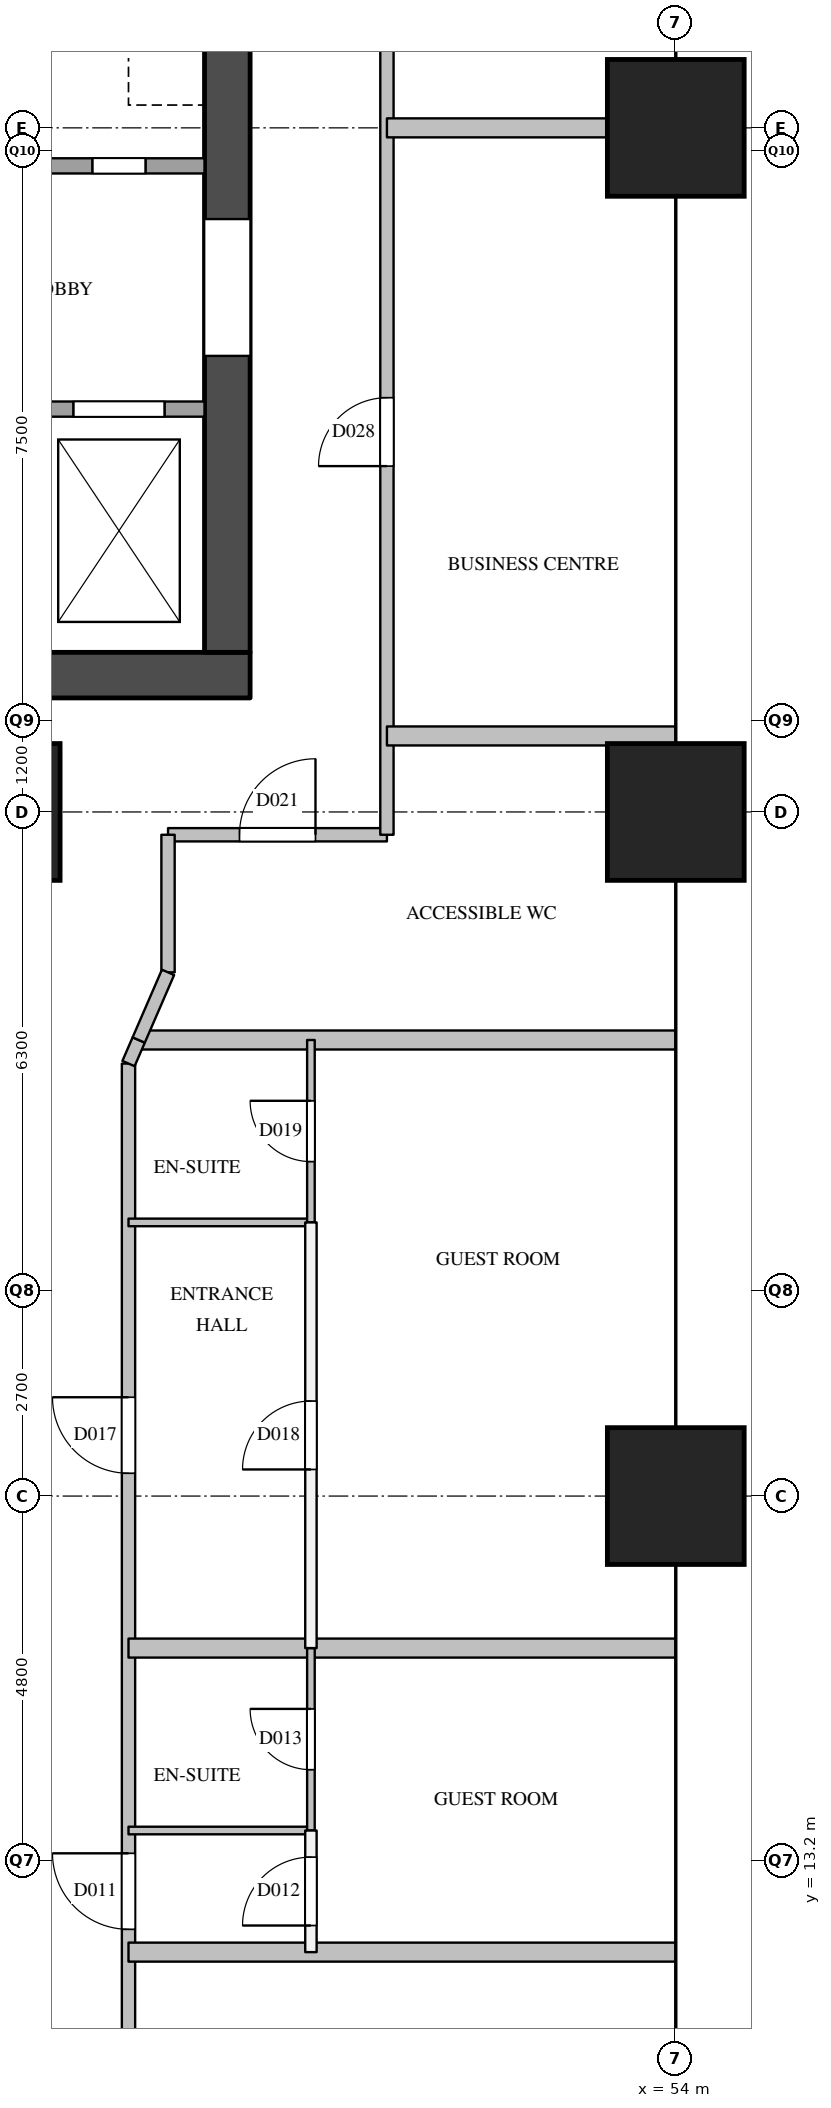
"""IFC4 building model, lengths in metres.
Left out: names, types, materials, properties, quantities, classifications, styles, units other than length and angle.
Written with IfcOpenShell. Run it as: python <this file> out.ifc"""

import sys

from ifc_helpers import new_model, si_unit, direction, frame, frame_2d, origin, origin_2d, place, context, subcontext, project, spatial, rectangle, extrude, element, fill, save


model = new_model("IFC4")
c1 = context("Model", 3, precision=1e-05, world=origin(), true_north=direction((0.0, 1.0)))
c2 = subcontext(c1, "Body", "Model", "MODEL_VIEW")
j1 = project(units=[si_unit("LENGTHUNIT", "METRE"), si_unit("PLANEANGLEUNIT", "RADIAN")], contexts=[c1])
p1 = place(None, origin())
s1 = spatial("IfcSite", under=j1, at=p1, CompositionType="ELEMENT")
p2 = place(p1, origin())
s2 = spatial("IfcBuilding", under=s1, at=p2, CompositionType="ELEMENT")
p3 = place(p2, frame((0.0, 0.0, 108.2)))
s3 = spatial("IfcBuildingStorey", under=s2, at=p3, CompositionType="ELEMENT", Elevation=108.2)
for number, where, z_axis, x_axis in (
    (1, (45.0, 27.0, 0.0), (0.0, 0.0, 1.0), (1.0, 0.0, 0.0)),
    (2, (54.0, 18.0, 0.0), (0.0, 0.0, 1.0), (1.0, 0.0, 0.0)),
    (3, (54.0, 27.0, 0.0), (0.0, 0.0, 1.0), (1.0, 0.0, 0.0)),
    (4, (54.0, 36.0, 0.0), (0.0, 0.0, 1.0), (1.0, 0.0, 0.0)),
):
    element("IfcColumn", number, at=place(p3, frame(where, z_axis=z_axis, x_axis=x_axis)), inside=s3, PredefinedType="COLUMN", context=c2, shape_type="SweptSolid", body=[
        extrude(rectangle(XDim=1.8, YDim=1.8, at=origin_2d()), origin(), (0.0, 0.0, 1.0), 3.8),
    ])
p4 = place(p3, frame((36.0, 28.8, 0.0), z_axis=(0.0, 0.0, 1.0), x_axis=(1.0, 0.0, 0.0)))
e5 = element("IfcWall", 5, at=p4, inside=s3, PredefinedType="SHEAR", context=c2, shape_type="SweptSolid", body=[
    extrude(rectangle(XDim=12.4, YDim=0.6, at=frame_2d((6.2, 0.0))), origin(), (0.0, 0.0, 1.0), 3.5),
])
p5 = place(p3, frame((48.1, 29.1, 0.0), z_axis=(0.0, 0.0, 1.0), x_axis=(0.0, 1.0, 0.0)))
e6 = element("IfcWall", 6, at=p5, inside=s3, PredefinedType="SHEAR", context=c2, shape_type="SweptSolid", body=[
    extrude(rectangle(XDim=20.3, YDim=0.6, at=frame_2d((10.15, 0.0))), origin(), (0.0, 0.0, 1.0), 3.5),
])
p6 = place(p5, frame((12.5, 0.0, 0.0)))
e7 = element("IfcOpeningElement", 7, at=p6, cuts=e6, PredefinedType="OPENING", context=c2, shape_type="SweptSolid", body=[
    extrude(rectangle(XDim=0.7, YDim=2.1, at=frame_2d((0.35, 1.05))), frame((0.0, 0.31, 0.0), z_axis=(0.0, -1.0, 0.0), x_axis=(1.0, 0.0, 0.0)), (0.0, 0.0, 1.0), 0.62),
])
p7 = place(p5, frame((3.9, 0.0, 0.0)))
e8 = element("IfcOpeningElement", 8, at=p7, cuts=e6, PredefinedType="OPENING", context=c2, shape_type="SweptSolid", body=[
    extrude(rectangle(XDim=1.8, YDim=2.1, at=frame_2d((0.9, 1.05))), frame((0.0, 0.31, 0.0), z_axis=(0.0, -1.0, 0.0), x_axis=(1.0, 0.0, 0.0)), (0.0, 0.0, 1.0), 0.62),
])
p8 = place(p3, frame((36.6, 32.3, 0.0), z_axis=(0.0, 0.0, 1.0), x_axis=(1.0, 0.0, 0.0)))
e9 = element("IfcWall", 9, at=p8, inside=s3, PredefinedType="SOLIDWALL", context=c2, shape_type="SweptSolid", body=[
    extrude(rectangle(XDim=11.2, YDim=0.2, at=frame_2d((5.6, 0.0))), origin(), (0.0, 0.0, 1.0), 3.5),
])
p9 = place(p8, frame((7.225, 0.0, 0.0)))
e10 = element("IfcOpeningElement", 10, at=p9, cuts=e9, PredefinedType="OPENING", context=c2, shape_type="SweptSolid", body=[
    extrude(rectangle(XDim=1.2, YDim=2.1, at=frame_2d((0.6, 1.05))), frame((0.0, 0.11, 0.0), z_axis=(0.0, -1.0, 0.0), x_axis=(1.0, 0.0, 0.0)), (0.0, 0.0, 1.0), 0.22),
])
p10 = place(p8, frame((9.475, 0.0, 0.0)))
e11 = element("IfcOpeningElement", 11, at=p10, cuts=e9, PredefinedType="OPENING", context=c2, shape_type="SweptSolid", body=[
    extrude(rectangle(XDim=1.2, YDim=2.1, at=frame_2d((0.6, 1.05))), frame((0.0, 0.11, 0.0), z_axis=(0.0, -1.0, 0.0), x_axis=(1.0, 0.0, 0.0)), (0.0, 0.0, 1.0), 0.22),
])
p11 = place(p3, frame((43.3, 35.5, 0.0), z_axis=(0.0, 0.0, 1.0), x_axis=(1.0, 0.0, 0.0)))
e12 = element("IfcWall", 12, at=p11, inside=s3, PredefinedType="SOLIDWALL", context=c2, shape_type="SweptSolid", body=[
    extrude(rectangle(XDim=4.5, YDim=0.2, at=frame_2d((2.25, 0.0))), origin(), (0.0, 0.0, 1.0), 3.5),
])
p12 = place(p11, frame((0.525, 0.0, 0.0)))
e13 = element("IfcOpeningElement", 13, at=p12, cuts=e12, PredefinedType="OPENING", context=c2, shape_type="SweptSolid", body=[
    extrude(rectangle(XDim=1.2, YDim=2.1, at=frame_2d((0.6, 1.05))), frame((0.0, 0.11, 0.0), z_axis=(0.0, -1.0, 0.0), x_axis=(1.0, 0.0, 0.0)), (0.0, 0.0, 1.0), 0.22),
])
p13 = place(p11, frame((3.025, 0.0, 0.0)))
e14 = element("IfcOpeningElement", 14, at=p13, cuts=e12, PredefinedType="OPENING", context=c2, shape_type="SweptSolid", body=[
    extrude(rectangle(XDim=0.7, YDim=2.1, at=frame_2d((0.35, 1.05))), frame((0.0, 0.11, 0.0), z_axis=(0.0, -1.0, 0.0), x_axis=(1.0, 0.0, 0.0)), (0.0, 0.0, 1.0), 0.22),
])
p14 = place(p3, frame((47.32, 26.7, 0.0), z_axis=(0.0, 0.0, 1.0), x_axis=(1.0, 0.0, 0.0)))
e15 = element("IfcWall", 15, at=p14, inside=s3, PredefinedType="PARTITIONING", context=c2, shape_type="SweptSolid", body=[
    extrude(rectangle(XDim=2.88, YDim=0.175, at=frame_2d((1.44, 0.0))), origin(), (0.0, 0.0, 1.0), 2.5),
])
p15 = place(p14, frame((0.94, 0.0, 0.0)))
e16 = element("IfcOpeningElement", 16, at=p15, cuts=e15, PredefinedType="OPENING", context=c2, shape_type="SweptSolid", body=[
    extrude(rectangle(XDim=1.0, YDim=2.1, at=frame_2d((0.5, 1.05))), frame((0.0, 0.097, 0.0), z_axis=(0.0, -1.0, 0.0), x_axis=(1.0, 0.0, 0.0)), (0.0, 0.0, 1.0), 0.195),
])
p16 = place(p3, frame((46.8, 7.2, 0.0), z_axis=(0.0, 0.0, 1.0), x_axis=(0.0, 1.0, 0.0)))
e17 = element("IfcWall", 17, at=p16, inside=s3, PredefinedType="PARTITIONING", context=c2, shape_type="SweptSolid", body=[
    extrude(rectangle(XDim=16.49, YDim=0.175, at=frame_2d((8.245, 0.0))), origin(), (0.0, 0.0, 1.0), 3.5),
])
p17 = place(p16, frame((1.95, 0.0, 0.0)))
e18 = element("IfcOpeningElement", 18, at=p17, cuts=e17, PredefinedType="OPENING", context=c2, shape_type="SweptSolid", body=[
    extrude(rectangle(XDim=0.9, YDim=2.1, at=frame_2d((0.45, 1.05))), frame((0.0, 0.097, 0.0), z_axis=(0.0, -1.0, 0.0), x_axis=(1.0, 0.0, 0.0)), (0.0, 0.0, 1.0), 0.195),
])
p18 = place(p16, frame((5.1, 0.0, 0.0)))
e19 = element("IfcOpeningElement", 19, at=p18, cuts=e17, PredefinedType="OPENING", context=c2, shape_type="SweptSolid", body=[
    extrude(rectangle(XDim=1.0, YDim=2.1, at=frame_2d((0.5, 1.05))), frame((0.0, 0.097, 0.0), z_axis=(0.0, -1.0, 0.0), x_axis=(1.0, 0.0, 0.0)), (0.0, 0.0, 1.0), 0.195),
])
p19 = place(p16, frame((11.1, 0.0, 0.0)))
e20 = element("IfcOpeningElement", 20, at=p19, cuts=e17, PredefinedType="OPENING", context=c2, shape_type="SweptSolid", body=[
    extrude(rectangle(XDim=1.0, YDim=2.1, at=frame_2d((0.5, 1.05))), frame((0.0, 0.097, 0.0), z_axis=(0.0, -1.0, 0.0), x_axis=(1.0, 0.0, 0.0)), (0.0, 0.0, 1.0), 0.195),
])
p20 = place(p3, frame((47.32, 24.89, 0.0), z_axis=(0.0, 0.0, 1.0), x_axis=(0.0, 1.0, 0.0)))
e21 = element("IfcWall", 21, at=p20, inside=s3, PredefinedType="PARTITIONING", context=c2, shape_type="SweptSolid", body=[
    extrude(rectangle(XDim=1.81, YDim=0.175, at=frame_2d((0.905, 0.0))), origin(), (0.0, 0.0, 1.0), 2.5),
])
p21 = place(p3, frame((50.2, 26.7, 0.0), z_axis=(0.0, 0.0, 1.0), x_axis=(0.0, 1.0, 0.0)))
e22 = element("IfcWall", 22, at=p21, inside=s3, PredefinedType="PARTITIONING", context=c2, shape_type="SweptSolid", body=[
    extrude(rectangle(XDim=25.1, YDim=0.175, at=frame_2d((12.55, 0.0))), origin(), (0.0, 0.0, 1.0), 2.5),
])
p22 = place(p21, frame((4.85, 0.0, 0.0)))
e23 = element("IfcOpeningElement", 23, at=p22, cuts=e22, PredefinedType="OPENING", context=c2, shape_type="SweptSolid", body=[
    extrude(rectangle(XDim=0.9, YDim=2.1, at=frame_2d((0.45, 1.05))), frame((0.0, 0.097, 0.0), z_axis=(0.0, -1.0, 0.0), x_axis=(1.0, 0.0, 0.0)), (0.0, 0.0, 1.0), 0.195),
])
p23 = place(p21, frame((12.85, 0.0, 0.0)))
e24 = element("IfcOpeningElement", 24, at=p23, cuts=e22, PredefinedType="OPENING", context=c2, shape_type="SweptSolid", body=[
    extrude(rectangle(XDim=0.9, YDim=2.1, at=frame_2d((0.45, 1.05))), frame((0.0, 0.097, 0.0), z_axis=(0.0, -1.0, 0.0), x_axis=(1.0, 0.0, 0.0)), (0.0, 0.0, 1.0), 0.195),
])
p24 = place(p21, frame((20.75, 0.0, 0.0)))
e25 = element("IfcOpeningElement", 25, at=p24, cuts=e22, PredefinedType="OPENING", context=c2, shape_type="SweptSolid", body=[
    extrude(rectangle(XDim=0.9, YDim=2.1, at=frame_2d((0.45, 1.05))), frame((0.0, 0.097, 0.0), z_axis=(0.0, -1.0, 0.0), x_axis=(1.0, 0.0, 0.0)), (0.0, 0.0, 1.0), 0.195),
])
p25 = place(p3, frame((49.2, 12.0, 0.0), z_axis=(0.0, 0.0, 1.0), x_axis=(0.0, 1.0, 0.0)))
e26 = element("IfcWall", 26, at=p25, inside=s3, PredefinedType="PARTITIONING", context=c2, shape_type="SweptSolid", body=[
    extrude(rectangle(XDim=1.6, YDim=0.15, at=frame_2d((0.8, 0.0))), origin(), (0.0, 0.0, 1.0), 3.5),
])
p26 = place(p25, frame((0.35, 0.0, 0.0)))
e27 = element("IfcOpeningElement", 27, at=p26, cuts=e26, PredefinedType="OPENING", context=c2, shape_type="SweptSolid", body=[
    extrude(rectangle(XDim=0.9, YDim=2.1, at=frame_2d((0.45, 1.05))), frame((0.0, 0.085, 0.0), z_axis=(0.0, -1.0, 0.0), x_axis=(1.0, 0.0, 0.0)), (0.0, 0.0, 1.0), 0.17),
])
p27 = place(p3, frame((49.2, 16.0, 0.0), z_axis=(0.0, 0.0, 1.0), x_axis=(0.0, 1.0, 0.0)))
e28 = element("IfcWall", 28, at=p27, inside=s3, PredefinedType="PARTITIONING", context=c2, shape_type="SweptSolid", body=[
    extrude(rectangle(XDim=5.6, YDim=0.15, at=frame_2d((2.8, 0.0))), origin(), (0.0, 0.0, 1.0), 3.5),
])
p28 = place(p27, frame((2.35, 0.0, 0.0)))
e29 = element("IfcOpeningElement", 29, at=p28, cuts=e28, PredefinedType="OPENING", context=c2, shape_type="SweptSolid", body=[
    extrude(rectangle(XDim=0.9, YDim=2.1, at=frame_2d((0.45, 1.05))), frame((0.0, 0.085, 0.0), z_axis=(0.0, -1.0, 0.0), x_axis=(1.0, 0.0, 0.0)), (0.0, 0.0, 1.0), 0.17),
])
for number, where, z_axis, x_axis in (
    (30, (46.8, 12.0, 0.0), (0.0, 0.0, 1.0), (1.0, 0.0, 0.0)),
    (31, (46.8, 16.0, 0.0), (0.0, 0.0, 1.0), (1.0, 0.0, 0.0)),
):
    element("IfcWall", number, at=place(p3, frame(where, z_axis=z_axis, x_axis=x_axis)), inside=s3, PredefinedType="PARTITIONING", context=c2, shape_type="SweptSolid", body=[
        extrude(rectangle(XDim=7.2, YDim=0.25, at=frame_2d((3.6, 0.0))), origin(), (0.0, 0.0, 1.0), 2.5),
    ])
p29 = place(p3, frame((46.934, 24.0, 0.0), z_axis=(0.0, 0.0, 1.0), x_axis=(1.0, 0.0, 0.0)))
e32 = element("IfcWall", 32, at=p29, inside=s3, PredefinedType="PARTITIONING", context=c2, shape_type="SweptSolid", body=[
    extrude(rectangle(XDim=7.066, YDim=0.25, at=frame_2d((3.533, 0.0))), origin(), (0.0, 0.0, 1.0), 2.5),
])
p30 = place(p3, frame((50.2, 28.0, 0.0), z_axis=(0.0, 0.0, 1.0), x_axis=(1.0, 0.0, 0.0)))
e33 = element("IfcWall", 33, at=p30, inside=s3, PredefinedType="PARTITIONING", context=c2, shape_type="SweptSolid", body=[
    extrude(rectangle(XDim=3.8, YDim=0.25, at=frame_2d((1.9, 0.0))), origin(), (0.0, 0.0, 1.0), 2.5),
])
p31 = place(p3, frame((50.2, 36.0, 0.0), z_axis=(0.0, 0.0, 1.0), x_axis=(1.0, 0.0, 0.0)))
e34 = element("IfcWall", 34, at=p31, inside=s3, PredefinedType="PARTITIONING", context=c2, shape_type="SweptSolid", body=[
    extrude(rectangle(XDim=3.8, YDim=0.25, at=frame_2d((1.9, 0.0))), origin(), (0.0, 0.0, 1.0), 3.5),
])
for number, where, z_axis, x_axis in (
    (35, (46.8, 13.6, 0.0), (0.0, 0.0, 1.0), (1.0, 0.0, 0.0)),
    (36, (46.8, 21.6, 0.0), (0.0, 0.0, 1.0), (1.0, 0.0, 0.0)),
):
    element("IfcWall", number, at=place(p3, frame(where, z_axis=z_axis, x_axis=x_axis)), inside=s3, PredefinedType="PARTITIONING", context=c2, shape_type="SweptSolid", body=[
        extrude(rectangle(XDim=2.4, YDim=0.1, at=frame_2d((1.2, 0.0))), origin(), (0.0, 0.0, 1.0), 3.5),
    ])
p32 = place(p3, frame((49.2, 13.6, 0.0), z_axis=(0.0, 0.0, 1.0), x_axis=(0.0, 1.0, 0.0)))
e37 = element("IfcWall", 37, at=p32, inside=s3, PredefinedType="PARTITIONING", context=c2, shape_type="SweptSolid", body=[
    extrude(rectangle(XDim=2.4, YDim=0.1, at=frame_2d((1.2, 0.0))), origin(), (0.0, 0.0, 1.0), 3.5),
])
p33 = place(p32, frame((0.8, 0.0, 0.0)))
e38 = element("IfcOpeningElement", 38, at=p33, cuts=e37, PredefinedType="OPENING", context=c2, shape_type="SweptSolid", body=[
    extrude(rectangle(XDim=0.8, YDim=2.1, at=frame_2d((0.4, 1.05))), frame((0.0, 0.06, 0.0), z_axis=(0.0, -1.0, 0.0), x_axis=(1.0, 0.0, 0.0)), (0.0, 0.0, 1.0), 0.12),
])
p34 = place(p3, frame((49.2, 21.6, 0.0), z_axis=(0.0, 0.0, 1.0), x_axis=(0.0, 1.0, 0.0)))
e39 = element("IfcWall", 39, at=p34, inside=s3, PredefinedType="PARTITIONING", context=c2, shape_type="SweptSolid", body=[
    extrude(rectangle(XDim=2.4, YDim=0.1, at=frame_2d((1.2, 0.0))), origin(), (0.0, 0.0, 1.0), 3.5),
])
p35 = place(p34, frame((0.8, 0.0, 0.0)))
e40 = element("IfcOpeningElement", 40, at=p35, cuts=e39, PredefinedType="OPENING", context=c2, shape_type="SweptSolid", body=[
    extrude(rectangle(XDim=0.8, YDim=2.1, at=frame_2d((0.4, 1.05))), frame((0.0, 0.06, 0.0), z_axis=(0.0, -1.0, 0.0), x_axis=(1.0, 0.0, 0.0)), (0.0, 0.0, 1.0), 0.12),
])
p36 = place(p3, frame((46.934, 24.0, 0.0), z_axis=(0.0, 0.0, 1.0), x_axis=(-0.397404653206, -0.917643471949, 0.0)))
e41 = element("IfcWall", 41, at=p36, inside=s3, PredefinedType="PARTITIONING", context=c2, shape_type="SweptSolid", body=[
    extrude(rectangle(XDim=0.338, YDim=0.175, at=frame_2d((0.169, 0.0))), origin(), (0.0, 0.0, 1.0), 3.5),
])
p37 = place(p3, frame((47.32, 24.89, 0.0), z_axis=(0.0, 0.0, 1.0), x_axis=(-0.397713396445, -0.917509702558, 0.0)))
e42 = element("IfcWall", 42, at=p37, inside=s3, PredefinedType="PARTITIONING", context=c2, shape_type="SweptSolid", body=[
    extrude(rectangle(XDim=0.97, YDim=0.175, at=frame_2d((0.485, 0.0))), origin(), (0.0, 0.0, 1.0), 3.5),
])
p38 = place(p10, origin())
e43 = element("IfcDoor", 43, at=p38, inside=s3, OperationType="SLIDING_TO_LEFT", PredefinedType="DOOR", context=c2, shape_type="SweptSolid", body=[
    extrude(rectangle(XDim=1.2, YDim=2.1, at=frame_2d((0.6, 1.05))), frame((0.0, 0.025, 0.0), z_axis=(0.0, -1.0, 0.0), x_axis=(1.0, 0.0, 0.0)), (0.0, 0.0, 1.0), 0.05),
])
fill(e11, e43)
p39 = place(p7, origin())
e44 = element("IfcDoor", 44, at=p39, inside=s3, OperationType="DOUBLE_DOOR_SINGLE_SWING", PredefinedType="DOOR", context=c2, shape_type="SweptSolid", body=[
    extrude(rectangle(XDim=1.8, YDim=2.1, at=frame_2d((0.9, 1.05))), frame((0.0, 0.025, 0.0), z_axis=(0.0, -1.0, 0.0), x_axis=(1.0, 0.0, 0.0)), (0.0, 0.0, 1.0), 0.05),
])
fill(e8, e44)
p40 = place(p13, origin())
e45 = element("IfcDoor", 45, at=p40, inside=s3, OperationType="SINGLE_SWING_RIGHT", PredefinedType="DOOR", context=c2, shape_type="SweptSolid", body=[
    extrude(rectangle(XDim=0.7, YDim=2.1, at=frame_2d((0.35, 1.05))), frame((0.0, 0.025, 0.0), z_axis=(0.0, -1.0, 0.0), x_axis=(1.0, 0.0, 0.0)), (0.0, 0.0, 1.0), 0.05),
])
fill(e14, e45)
p41 = place(p18, origin())
e46 = element("IfcDoor", 46, at=p41, inside=s3, OperationType="SINGLE_SWING_RIGHT", PredefinedType="DOOR", context=c2, shape_type="SweptSolid", body=[
    extrude(rectangle(XDim=1.0, YDim=2.1, at=frame_2d((0.5, 1.05))), frame((0.0, 0.025, 0.0), z_axis=(0.0, -1.0, 0.0), x_axis=(1.0, 0.0, 0.0)), (0.0, 0.0, 1.0), 0.05),
])
fill(e19, e46)
p42 = place(p26, origin())
e47 = element("IfcDoor", 47, at=p42, inside=s3, OperationType="SINGLE_SWING_LEFT", PredefinedType="DOOR", context=c2, shape_type="SweptSolid", body=[
    extrude(rectangle(XDim=0.9, YDim=2.1, at=frame_2d((0.45, 1.05))), frame((0.0, 0.025, 0.0), z_axis=(0.0, -1.0, 0.0), x_axis=(1.0, 0.0, 0.0)), (0.0, 0.0, 1.0), 0.05),
])
fill(e27, e47)
p43 = place(p33, origin())
e48 = element("IfcDoor", 48, at=p43, inside=s3, OperationType="SINGLE_SWING_RIGHT", PredefinedType="DOOR", context=c2, shape_type="SweptSolid", body=[
    extrude(rectangle(XDim=0.8, YDim=2.1, at=frame_2d((0.4, 1.05))), frame((0.0, 0.025, 0.0), z_axis=(0.0, -1.0, 0.0), x_axis=(1.0, 0.0, 0.0)), (0.0, 0.0, 1.0), 0.05),
])
fill(e38, e48)
p44 = place(p19, origin())
e49 = element("IfcDoor", 49, at=p44, inside=s3, OperationType="SINGLE_SWING_RIGHT", PredefinedType="DOOR", context=c2, shape_type="SweptSolid", body=[
    extrude(rectangle(XDim=1.0, YDim=2.1, at=frame_2d((0.5, 1.05))), frame((0.0, 0.025, 0.0), z_axis=(0.0, -1.0, 0.0), x_axis=(1.0, 0.0, 0.0)), (0.0, 0.0, 1.0), 0.05),
])
fill(e20, e49)
p45 = place(p28, origin())
e50 = element("IfcDoor", 50, at=p45, inside=s3, OperationType="SINGLE_SWING_LEFT", PredefinedType="DOOR", context=c2, shape_type="SweptSolid", body=[
    extrude(rectangle(XDim=0.9, YDim=2.1, at=frame_2d((0.45, 1.05))), frame((0.0, 0.025, 0.0), z_axis=(0.0, -1.0, 0.0), x_axis=(1.0, 0.0, 0.0)), (0.0, 0.0, 1.0), 0.05),
])
fill(e29, e50)
p46 = place(p35, origin())
e51 = element("IfcDoor", 51, at=p46, inside=s3, OperationType="SINGLE_SWING_RIGHT", PredefinedType="DOOR", context=c2, shape_type="SweptSolid", body=[
    extrude(rectangle(XDim=0.8, YDim=2.1, at=frame_2d((0.4, 1.05))), frame((0.0, 0.025, 0.0), z_axis=(0.0, -1.0, 0.0), x_axis=(1.0, 0.0, 0.0)), (0.0, 0.0, 1.0), 0.05),
])
fill(e40, e51)
p47 = place(p15, origin())
e52 = element("IfcDoor", 52, at=p47, inside=s3, OperationType="SINGLE_SWING_RIGHT", PredefinedType="DOOR", context=c2, shape_type="SweptSolid", body=[
    extrude(rectangle(XDim=1.0, YDim=2.1, at=frame_2d((0.5, 1.05))), frame((0.0, 0.025, 0.0), z_axis=(0.0, -1.0, 0.0), x_axis=(1.0, 0.0, 0.0)), (0.0, 0.0, 1.0), 0.05),
])
fill(e16, e52)
p48 = place(p22, origin())
e53 = element("IfcDoor", 53, at=p48, inside=s3, OperationType="SINGLE_SWING_LEFT", PredefinedType="DOOR", context=c2, shape_type="SweptSolid", body=[
    extrude(rectangle(XDim=0.9, YDim=2.1, at=frame_2d((0.45, 1.05))), frame((0.0, 0.025, 0.0), z_axis=(0.0, -1.0, 0.0), x_axis=(1.0, 0.0, 0.0)), (0.0, 0.0, 1.0), 0.05),
])
fill(e23, e53)
save(model, sys.argv[1])
